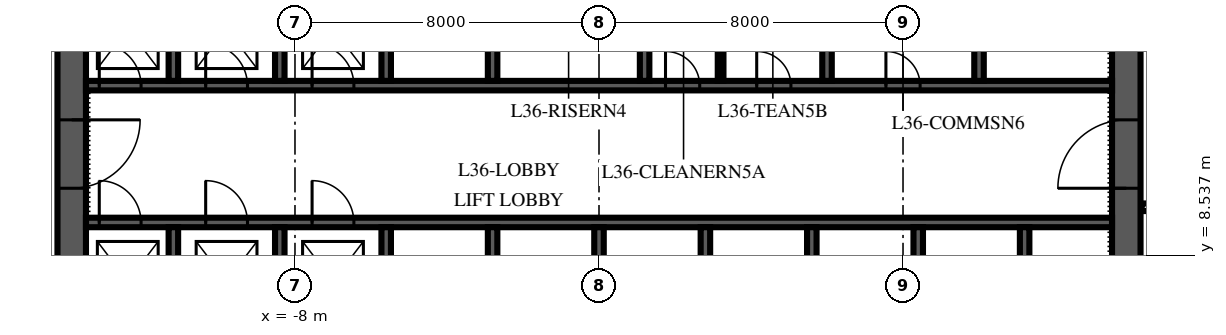
"""IFC4 building model, lengths in metres.
Left out: names, types, materials, properties, quantities, classifications, styles, units other than length and angle.
Written with IfcOpenShell. Run it as: python <this file> out.ifc"""

import sys

from ifc_helpers import new_model, si_unit, direction, frame, frame_2d, origin, place, context, subcontext, project, spatial, polyline, rectangle, outline, extrude, element, fill, save


model = new_model("IFC4")
c1 = context("Model", 3, precision=1e-05, world=origin(), true_north=direction((0.0, 1.0)))
c2 = subcontext(c1, "Body", "Model", "MODEL_VIEW")
j1 = project(units=[si_unit("LENGTHUNIT", "METRE"), si_unit("PLANEANGLEUNIT", "RADIAN")], contexts=[c1])
p1 = place(None, origin())
s1 = spatial("IfcSite", under=j1, at=p1, CompositionType="ELEMENT")
p2 = place(p1, origin())
s2 = spatial("IfcBuilding", under=s1, at=p2, CompositionType="ELEMENT")
p3 = place(p2, frame((0.0, 0.0, 159.0)))
s3 = spatial("IfcBuildingStorey", under=s2, at=p3, CompositionType="ELEMENT", Elevation=159.0)
p4 = place(p3, frame((13.875, 6.125, 0.0), z_axis=(0.0, 0.0, 1.0), x_axis=(0.0, 1.0, 0.0)))
e1 = element("IfcWall", 1, at=p4, inside=s3, PredefinedType="SHEAR", context=c2, shape_type="SweptSolid", body=[
    extrude(outline(polyline([(0.0, -0.375), (17.75, -0.375), (17.75, 0.0), (17.375, 0.0), (17.375, 0.375), (0.375, 0.375), (0.375, 0.0), (0.0, 0.0), (0.0, -0.375)])), origin(), (0.0, 0.0, 1.0), 4.0),
])
p5 = place(p4, frame((4.175, 0.0, 0.0)))
e2 = element("IfcOpeningElement", 2, at=p5, cuts=e1, PredefinedType="OPENING", context=c2, shape_type="SweptSolid", body=[
    extrude(rectangle(XDim=1.8, YDim=2.4, at=frame_2d((0.9, 1.2))), frame((0.0, 0.39, 0.0), z_axis=(0.0, -1.0, 0.0), x_axis=(1.0, 0.0, 0.0)), (0.0, 0.0, 1.0), 0.78),
])
p6 = place(p3, frame((-13.875, 23.875, 0.0), z_axis=(0.0, 0.0, 1.0), x_axis=(0.0, -1.0, 0.0)))
e3 = element("IfcWall", 3, at=p6, inside=s3, PredefinedType="SHEAR", context=c2, shape_type="SweptSolid", body=[
    extrude(outline(polyline([(0.0, -0.375), (17.75, -0.375), (17.75, 0.0), (17.375, 0.0), (17.375, 0.375), (0.375, 0.375), (0.375, 0.0), (0.0, 0.0), (0.0, -0.375)])), origin(), (0.0, 0.0, 1.0), 4.0),
])
p7 = place(p6, frame((11.775, 0.0, 0.0)))
e4 = element("IfcOpeningElement", 4, at=p7, cuts=e3, PredefinedType="OPENING", context=c2, shape_type="SweptSolid", body=[
    extrude(rectangle(XDim=1.8, YDim=2.4, at=frame_2d((0.9, 1.2))), frame((0.0, 0.39, 0.0), z_axis=(0.0, -1.0, 0.0), x_axis=(1.0, 0.0, 0.0)), (0.0, 0.0, 1.0), 0.78),
])
p8 = place(p3, frame((-13.5, 9.4, 0.0), z_axis=(0.0, 0.0, 1.0), x_axis=(1.0, 0.0, 0.0)))
e5 = element("IfcWall", 5, at=p8, inside=s3, PredefinedType="SHEAR", context=c2, shape_type="SweptSolid", body=[
    extrude(rectangle(XDim=27.0, YDim=0.25, at=frame_2d((13.5, 0.0))), origin(), (0.0, 0.0, 1.0), 4.0),
])
p9 = place(p8, frame((0.35, 0.0, 0.0)))
e6 = element("IfcOpeningElement", 6, at=p9, cuts=e5, PredefinedType="OPENING", context=c2, shape_type="SweptSolid", body=[
    extrude(rectangle(XDim=1.1, YDim=2.1, at=frame_2d((0.55, 1.05))), frame((0.0, 0.14, 0.0), z_axis=(0.0, -1.0, 0.0), x_axis=(1.0, 0.0, 0.0)), (0.0, 0.0, 1.0), 0.28),
])
p10 = place(p8, frame((3.15, 0.0, 0.0)))
e7 = element("IfcOpeningElement", 7, at=p10, cuts=e5, PredefinedType="OPENING", context=c2, shape_type="SweptSolid", body=[
    extrude(rectangle(XDim=1.1, YDim=2.1, at=frame_2d((0.55, 1.05))), frame((0.0, 0.14, 0.0), z_axis=(0.0, -1.0, 0.0), x_axis=(1.0, 0.0, 0.0)), (0.0, 0.0, 1.0), 0.28),
])
p11 = place(p8, frame((5.95, 0.0, 0.0)))
e8 = element("IfcOpeningElement", 8, at=p11, cuts=e5, PredefinedType="OPENING", context=c2, shape_type="SweptSolid", body=[
    extrude(rectangle(XDim=1.1, YDim=2.1, at=frame_2d((0.55, 1.05))), frame((0.0, 0.14, 0.0), z_axis=(0.0, -1.0, 0.0), x_axis=(1.0, 0.0, 0.0)), (0.0, 0.0, 1.0), 0.28),
])
p12 = place(p3, frame((-13.5, 13.0, 0.0), z_axis=(0.0, 0.0, 1.0), x_axis=(1.0, 0.0, 0.0)))
e9 = element("IfcWall", 9, at=p12, inside=s3, PredefinedType="SHEAR", context=c2, shape_type="SweptSolid", body=[
    extrude(rectangle(XDim=27.0, YDim=0.25, at=frame_2d((13.5, 0.0))), origin(), (0.0, 0.0, 1.0), 4.0),
])
p13 = place(p12, frame((0.35, 0.0, 0.0)))
e10 = element("IfcOpeningElement", 10, at=p13, cuts=e9, PredefinedType="OPENING", context=c2, shape_type="SweptSolid", body=[
    extrude(rectangle(XDim=1.1, YDim=2.1, at=frame_2d((0.55, 1.05))), frame((0.0, 0.14, 0.0), z_axis=(0.0, -1.0, 0.0), x_axis=(1.0, 0.0, 0.0)), (0.0, 0.0, 1.0), 0.28),
])
p14 = place(p12, frame((3.15, 0.0, 0.0)))
e11 = element("IfcOpeningElement", 11, at=p14, cuts=e9, PredefinedType="OPENING", context=c2, shape_type="SweptSolid", body=[
    extrude(rectangle(XDim=1.1, YDim=2.1, at=frame_2d((0.55, 1.05))), frame((0.0, 0.14, 0.0), z_axis=(0.0, -1.0, 0.0), x_axis=(1.0, 0.0, 0.0)), (0.0, 0.0, 1.0), 0.28),
])
p15 = place(p12, frame((5.95, 0.0, 0.0)))
e12 = element("IfcOpeningElement", 12, at=p15, cuts=e9, PredefinedType="OPENING", context=c2, shape_type="SweptSolid", body=[
    extrude(rectangle(XDim=1.1, YDim=2.1, at=frame_2d((0.55, 1.05))), frame((0.0, 0.14, 0.0), z_axis=(0.0, -1.0, 0.0), x_axis=(1.0, 0.0, 0.0)), (0.0, 0.0, 1.0), 0.28),
])
p16 = place(p12, frame((15.25, 0.0, 0.0)))
e13 = element("IfcOpeningElement", 13, at=p16, cuts=e9, PredefinedType="OPENING", context=c2, shape_type="SweptSolid", body=[
    extrude(rectangle(XDim=0.9, YDim=2.1, at=frame_2d((0.45, 1.05))), frame((0.0, 0.14, 0.0), z_axis=(0.0, -1.0, 0.0), x_axis=(1.0, 0.0, 0.0)), (0.0, 0.0, 1.0), 0.28),
])
p17 = place(p12, frame((17.65, 0.0, 0.0)))
e14 = element("IfcOpeningElement", 14, at=p17, cuts=e9, PredefinedType="OPENING", context=c2, shape_type="SweptSolid", body=[
    extrude(rectangle(XDim=0.9, YDim=2.1, at=frame_2d((0.45, 1.05))), frame((0.0, 0.14, 0.0), z_axis=(0.0, -1.0, 0.0), x_axis=(1.0, 0.0, 0.0)), (0.0, 0.0, 1.0), 0.28),
])
p18 = place(p12, frame((21.05, 0.0, 0.0)))
e15 = element("IfcOpeningElement", 15, at=p18, cuts=e9, PredefinedType="OPENING", context=c2, shape_type="SweptSolid", body=[
    extrude(rectangle(XDim=0.9, YDim=2.1, at=frame_2d((0.45, 1.05))), frame((0.0, 0.14, 0.0), z_axis=(0.0, -1.0, 0.0), x_axis=(1.0, 0.0, 0.0)), (0.0, 0.0, 1.0), 0.28),
])
for number, where, z_axis, x_axis in (
    (16, (-11.2, 6.5, 0.0), (0.0, 0.0, 1.0), (0.0, 1.0, 0.0)),
    (17, (-8.4, 6.5, 0.0), (0.0, 0.0, 1.0), (0.0, 1.0, 0.0)),
    (18, (-5.6, 6.5, 0.0), (0.0, 0.0, 1.0), (0.0, 1.0, 0.0)),
    (19, (-2.8, 6.5, 0.0), (0.0, 0.0, 1.0), (0.0, 1.0, 0.0)),
    (20, (0.0, 6.5, 0.0), (0.0, 0.0, 1.0), (0.0, 1.0, 0.0)),
    (21, (2.8, 6.5, 0.0), (0.0, 0.0, 1.0), (0.0, 1.0, 0.0)),
    (22, (5.6, 6.5, 0.0), (0.0, 0.0, 1.0), (0.0, 1.0, 0.0)),
    (23, (8.4, 6.5, 0.0), (0.0, 0.0, 1.0), (0.0, 1.0, 0.0)),
    (24, (11.2, 6.5, 0.0), (0.0, 0.0, 1.0), (0.0, 1.0, 0.0)),
):
    element("IfcWall", number, at=place(p3, frame(where, z_axis=z_axis, x_axis=x_axis)), inside=s3, PredefinedType="SHEAR", context=c2, shape_type="SweptSolid", body=[
        extrude(rectangle(XDim=2.775, YDim=0.25, at=frame_2d((1.387, 0.0))), origin(), (0.0, 0.0, 1.0), 4.0),
    ])
for number, where, z_axis, x_axis in (
    (25, (-11.2, 13.125, 0.0), (0.0, 0.0, 1.0), (0.0, 1.0, 0.0)),
    (26, (-8.4, 13.125, 0.0), (0.0, 0.0, 1.0), (0.0, 1.0, 0.0)),
    (27, (-5.6, 13.125, 0.0), (0.0, 0.0, 1.0), (0.0, 1.0, 0.0)),
    (28, (-2.8, 13.125, 0.0), (0.0, 0.0, 1.0), (0.0, 1.0, 0.0)),
    (29, (1.2, 13.125, 0.0), (0.0, 0.0, 1.0), (0.0, 1.0, 0.0)),
    (30, (6.0, 13.125, 0.0), (0.0, 0.0, 1.0), (0.0, 1.0, 0.0)),
    (31, (10.0, 13.125, 0.0), (0.0, 0.0, 1.0), (0.0, 1.0, 0.0)),
):
    element("IfcWall", number, at=place(p3, frame(where, z_axis=z_axis, x_axis=x_axis)), inside=s3, PredefinedType="SHEAR", context=c2, shape_type="SweptSolid", body=[
        extrude(rectangle(XDim=2.75, YDim=0.25, at=frame_2d((1.375, 0.0))), origin(), (0.0, 0.0, 1.0), 4.0),
    ])
p19 = place(p3, frame((3.2, 13.125, 0.0), z_axis=(0.0, 0.0, 1.0), x_axis=(0.0, 1.0, 0.0)))
e32 = element("IfcWall", 32, at=p19, inside=s3, PredefinedType="PARTITIONING", context=c2, shape_type="SweptSolid", body=[
    extrude(rectangle(XDim=2.75, YDim=0.15, at=frame_2d((1.375, 0.0))), origin(), (0.0, 0.0, 1.0), 3.85),
])
p20 = place(p3, frame((14.28, 9.8, 0.0), z_axis=(0.0, 0.0, 1.0), x_axis=(1.0, 0.0, 0.0)))
e33 = element("IfcWall", 33, at=p20, inside=s3, PredefinedType="PARTITIONING", context=c2, shape_type="SweptSolid", body=[
    extrude(rectangle(XDim=2.02, YDim=0.2, at=frame_2d((1.01, 0.0))), origin(), (0.0, 0.0, 1.0), 3.85),
])
p21 = place(p5, origin())
e34 = element("IfcDoor", 34, at=p21, inside=s3, OperationType="DOUBLE_DOOR_SINGLE_SWING", PredefinedType="DOOR", context=c2, shape_type="SweptSolid", body=[
    extrude(rectangle(XDim=1.8, YDim=2.4, at=frame_2d((0.9, 1.2))), frame((0.0, 0.375, 0.0), z_axis=(0.0, -1.0, 0.0), x_axis=(1.0, 0.0, 0.0)), (0.0, 0.0, 1.0), 0.75),
])
fill(e2, e34)
p22 = place(p7, origin())
e35 = element("IfcDoor", 35, at=p22, inside=s3, OperationType="DOUBLE_DOOR_SINGLE_SWING", PredefinedType="DOOR", context=c2, shape_type="SweptSolid", body=[
    extrude(rectangle(XDim=1.8, YDim=2.4, at=frame_2d((0.9, 1.2))), frame((0.0, 0.375, 0.0), z_axis=(0.0, -1.0, 0.0), x_axis=(1.0, 0.0, 0.0)), (0.0, 0.0, 1.0), 0.75),
])
fill(e4, e35)
p23 = place(p9, origin())
e36 = element("IfcDoor", 36, at=p23, inside=s3, OperationType="SLIDING_TO_LEFT", PredefinedType="DOOR", context=c2, shape_type="SweptSolid", body=[
    extrude(rectangle(XDim=1.1, YDim=2.1, at=frame_2d((0.55, 1.05))), frame((0.0, 0.125, 0.0), z_axis=(0.0, -1.0, 0.0), x_axis=(1.0, 0.0, 0.0)), (0.0, 0.0, 1.0), 0.25),
])
fill(e6, e36)
p24 = place(p10, origin())
e37 = element("IfcDoor", 37, at=p24, inside=s3, OperationType="SLIDING_TO_LEFT", PredefinedType="DOOR", context=c2, shape_type="SweptSolid", body=[
    extrude(rectangle(XDim=1.1, YDim=2.1, at=frame_2d((0.55, 1.05))), frame((0.0, 0.125, 0.0), z_axis=(0.0, -1.0, 0.0), x_axis=(1.0, 0.0, 0.0)), (0.0, 0.0, 1.0), 0.25),
])
fill(e7, e37)
p25 = place(p11, origin())
e38 = element("IfcDoor", 38, at=p25, inside=s3, OperationType="SLIDING_TO_LEFT", PredefinedType="DOOR", context=c2, shape_type="SweptSolid", body=[
    extrude(rectangle(XDim=1.1, YDim=2.1, at=frame_2d((0.55, 1.05))), frame((0.0, 0.125, 0.0), z_axis=(0.0, -1.0, 0.0), x_axis=(1.0, 0.0, 0.0)), (0.0, 0.0, 1.0), 0.25),
])
fill(e8, e38)
p26 = place(p13, origin())
e39 = element("IfcDoor", 39, at=p26, inside=s3, OperationType="SLIDING_TO_LEFT", PredefinedType="DOOR", context=c2, shape_type="SweptSolid", body=[
    extrude(rectangle(XDim=1.1, YDim=2.1, at=frame_2d((0.55, 1.05))), frame((0.0, 0.125, 0.0), z_axis=(0.0, -1.0, 0.0), x_axis=(1.0, 0.0, 0.0)), (0.0, 0.0, 1.0), 0.25),
])
fill(e10, e39)
p27 = place(p14, origin())
e40 = element("IfcDoor", 40, at=p27, inside=s3, OperationType="SLIDING_TO_LEFT", PredefinedType="DOOR", context=c2, shape_type="SweptSolid", body=[
    extrude(rectangle(XDim=1.1, YDim=2.1, at=frame_2d((0.55, 1.05))), frame((0.0, 0.125, 0.0), z_axis=(0.0, -1.0, 0.0), x_axis=(1.0, 0.0, 0.0)), (0.0, 0.0, 1.0), 0.25),
])
fill(e11, e40)
p28 = place(p15, origin())
e41 = element("IfcDoor", 41, at=p28, inside=s3, OperationType="SLIDING_TO_LEFT", PredefinedType="DOOR", context=c2, shape_type="SweptSolid", body=[
    extrude(rectangle(XDim=1.1, YDim=2.1, at=frame_2d((0.55, 1.05))), frame((0.0, 0.125, 0.0), z_axis=(0.0, -1.0, 0.0), x_axis=(1.0, 0.0, 0.0)), (0.0, 0.0, 1.0), 0.25),
])
fill(e12, e41)
p29 = place(p16, origin())
e42 = element("IfcDoor", 42, at=p29, inside=s3, OperationType="SINGLE_SWING_LEFT", PredefinedType="DOOR", context=c2, shape_type="SweptSolid", body=[
    extrude(rectangle(XDim=0.9, YDim=2.1, at=frame_2d((0.45, 1.05))), frame((0.0, 0.125, 0.0), z_axis=(0.0, -1.0, 0.0), x_axis=(1.0, 0.0, 0.0)), (0.0, 0.0, 1.0), 0.25),
])
fill(e13, e42)
p30 = place(p17, origin())
e43 = element("IfcDoor", 43, at=p30, inside=s3, OperationType="SINGLE_SWING_LEFT", PredefinedType="DOOR", context=c2, shape_type="SweptSolid", body=[
    extrude(rectangle(XDim=0.9, YDim=2.1, at=frame_2d((0.45, 1.05))), frame((0.0, 0.125, 0.0), z_axis=(0.0, -1.0, 0.0), x_axis=(1.0, 0.0, 0.0)), (0.0, 0.0, 1.0), 0.25),
])
fill(e14, e43)
p31 = place(p18, origin())
e44 = element("IfcDoor", 44, at=p31, inside=s3, OperationType="SINGLE_SWING_LEFT", PredefinedType="DOOR", context=c2, shape_type="SweptSolid", body=[
    extrude(rectangle(XDim=0.9, YDim=2.1, at=frame_2d((0.45, 1.05))), frame((0.0, 0.125, 0.0), z_axis=(0.0, -1.0, 0.0), x_axis=(1.0, 0.0, 0.0)), (0.0, 0.0, 1.0), 0.25),
])
fill(e15, e44)
save(model, sys.argv[1])
